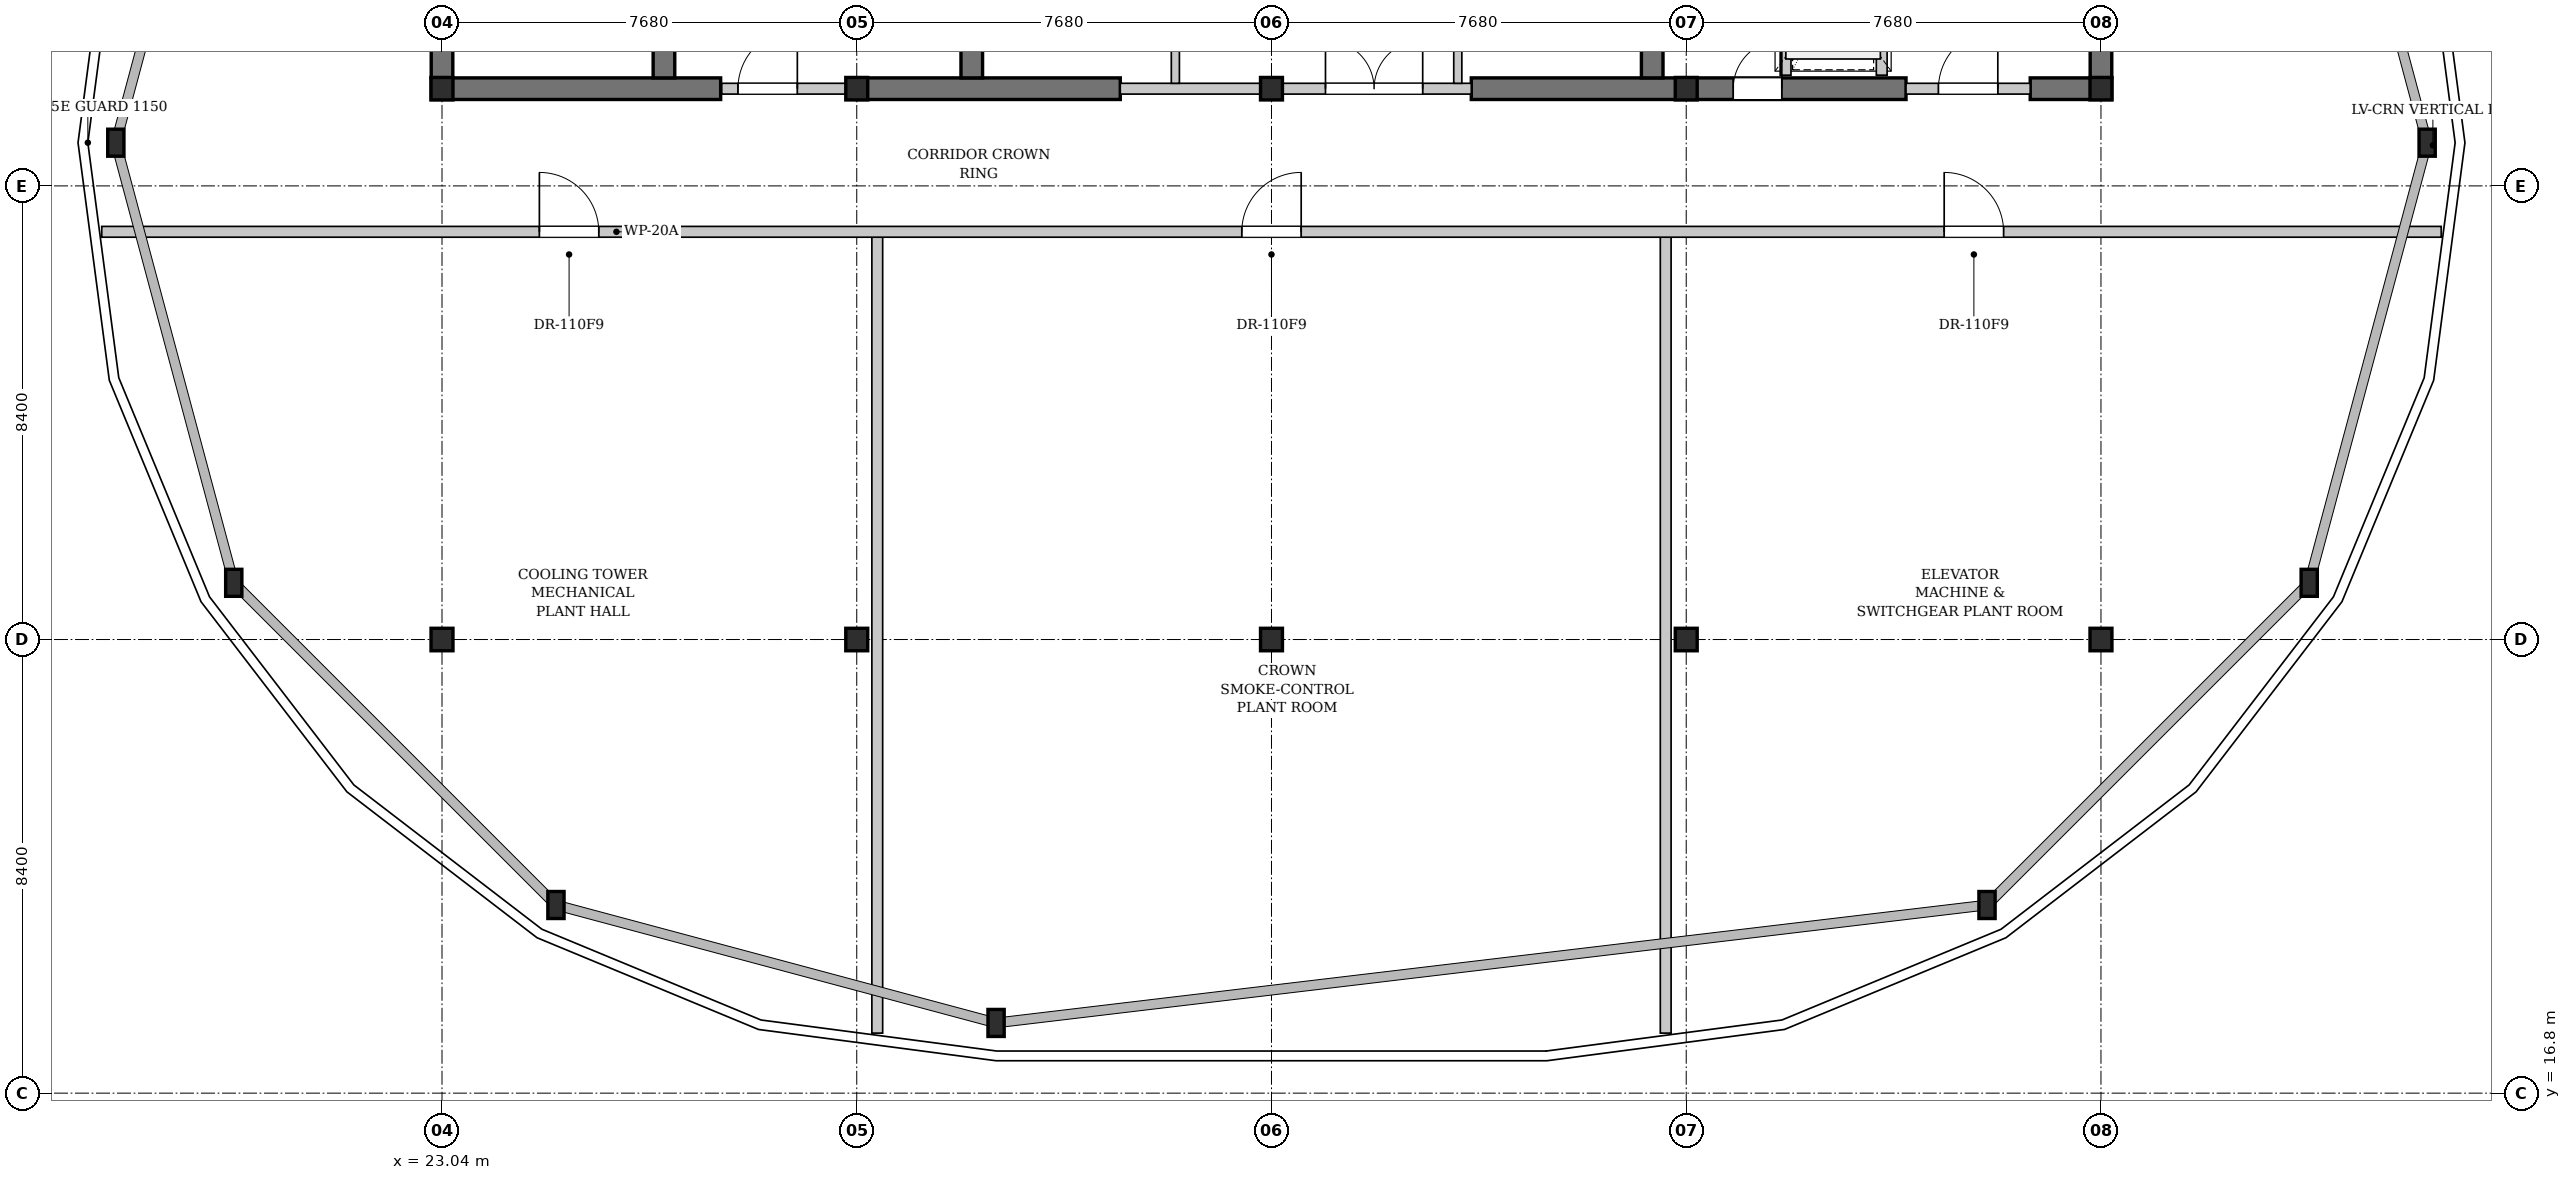
"""IFC4 building model, lengths in metres.
Left out: names, types, materials, properties, quantities, classifications, styles, units other than length and angle.
Written with IfcOpenShell. Run it as: python <this file> out.ifc"""

import sys

from ifc_helpers import new_model, si_unit, direction, frame, frame_2d, origin, origin_2d, place, context, subcontext, project, spatial, rectangle, i_section, extrude, element, fill, save


model = new_model("IFC4")
c1 = context("Model", 3, precision=1e-05, world=origin(), true_north=direction((0.0, 1.0)))
c2 = subcontext(c1, "Body", "Model", "MODEL_VIEW")
j1 = project(units=[si_unit("LENGTHUNIT", "METRE"), si_unit("PLANEANGLEUNIT", "RADIAN")], contexts=[c1])
p1 = place(None, origin())
s1 = spatial("IfcSite", under=j1, at=p1, CompositionType="ELEMENT")
p2 = place(p1, origin())
s2 = spatial("IfcBuilding", under=s1, at=p2, CompositionType="ELEMENT")
p3 = place(p2, frame((0.0, 0.0, 304.4)))
s3 = spatial("IfcBuildingStorey", under=s2, at=p3, CompositionType="ELEMENT", Elevation=304.4)
p4 = place(p3, frame((22.84, 35.4, 0.0), z_axis=(0.0, 0.0, 1.0), x_axis=(1.0, 0.0, 0.0)))
e1 = element("IfcWall", 1, at=p4, inside=s3, PredefinedType="SHEAR", context=c2, shape_type="SweptSolid", body=[
    extrude(rectangle(XDim=5.36, YDim=0.4, at=frame_2d((2.68, 0.0))), origin(), (0.0, 0.0, 1.0), 5.28),
])
p5 = place(p3, frame((30.72, 35.4, 0.0), z_axis=(0.0, 0.0, 1.0), x_axis=(1.0, 0.0, 0.0)))
e2 = element("IfcWall", 2, at=p5, inside=s3, PredefinedType="SHEAR", context=c2, shape_type="SweptSolid", body=[
    extrude(rectangle(XDim=4.88, YDim=0.4, at=frame_2d((2.44, 0.0))), origin(), (0.0, 0.0, 1.0), 5.28),
])
p6 = place(p3, frame((42.1, 35.4, 0.0), z_axis=(0.0, 0.0, 1.0), x_axis=(1.0, 0.0, 0.0)))
e3 = element("IfcWall", 3, at=p6, inside=s3, PredefinedType="SHEAR", context=c2, shape_type="SweptSolid", body=[
    extrude(rectangle(XDim=8.05, YDim=0.4, at=frame_2d((4.025, 0.0))), origin(), (0.0, 0.0, 1.0), 5.28),
])
p7 = place(p6, frame((4.85, 0.0, 0.0)))
e4 = element("IfcOpeningElement", 4, at=p7, cuts=e3, PredefinedType="OPENING", context=c2, shape_type="SweptSolid", body=[
    extrude(rectangle(XDim=0.9, YDim=2.15, at=frame_2d((0.45, 1.075))), frame((0.0, 0.21, 0.0), z_axis=(0.0, -1.0, 0.0), x_axis=(1.0, 0.0, 0.0)), (0.0, 0.0, 1.0), 0.42),
])
p8 = place(p3, frame((52.45, 35.4, 0.0), z_axis=(0.0, 0.0, 1.0), x_axis=(1.0, 0.0, 0.0)))
e5 = element("IfcWall", 5, at=p8, inside=s3, PredefinedType="SHEAR", context=c2, shape_type="SweptSolid", body=[
    extrude(rectangle(XDim=1.51, YDim=0.4, at=frame_2d((0.755, 0.0))), origin(), (0.0, 0.0, 1.0), 5.28),
])
p9 = place(p3, frame((23.04, 35.6, 0.0), z_axis=(0.0, 0.0, 1.0), x_axis=(0.0, 1.0, 0.0)))
e6 = element("IfcWall", 6, at=p9, inside=s3, PredefinedType="SHEAR", context=c2, shape_type="SweptSolid", body=[
    extrude(rectangle(XDim=10.4, YDim=0.4, at=frame_2d((5.2, 0.0))), origin(), (0.0, 0.0, 1.0), 5.28),
])
p10 = place(p3, frame((27.15, 35.6, 0.0), z_axis=(0.0, 0.0, 1.0), x_axis=(0.0, 1.0, 0.0)))
e7 = element("IfcWall", 7, at=p10, inside=s3, PredefinedType="SHEAR", context=c2, shape_type="SweptSolid", body=[
    extrude(rectangle(XDim=10.4, YDim=0.4, at=frame_2d((5.2, 0.0))), origin(), (0.0, 0.0, 1.0), 5.28),
])
p11 = place(p10, frame((0.7, 0.0, 0.0)))
e8 = element("IfcOpeningElement", 8, at=p11, cuts=e7, PredefinedType="OPENING", context=c2, shape_type="SweptSolid", body=[
    extrude(rectangle(XDim=1.1, YDim=2.15, at=frame_2d((0.55, 1.075))), frame((0.0, 0.21, 0.0), z_axis=(0.0, -1.0, 0.0), x_axis=(1.0, 0.0, 0.0)), (0.0, 0.0, 1.0), 0.42),
])
for number, where, z_axis, x_axis in (
    (9, (32.85, 35.6, 0.0), (0.0, 0.0, 1.0), (0.0, 1.0, 0.0)),
    (10, (45.45, 35.6, 0.0), (0.0, 0.0, 1.0), (0.0, 1.0, 0.0)),
    (11, (53.76, 35.6, 0.0), (0.0, 0.0, 1.0), (0.0, 1.0, 0.0)),
):
    element("IfcWall", number, at=place(p3, frame(where, z_axis=z_axis, x_axis=x_axis)), inside=s3, PredefinedType="SHEAR", context=c2, shape_type="SweptSolid", body=[
        extrude(rectangle(XDim=10.4, YDim=0.4, at=frame_2d((5.2, 0.0))), origin(), (0.0, 0.0, 1.0), 5.28),
    ])
for number, where, z_axis, x_axis in (
    (12, (23.04, 35.4, 0.0), (0.0, 0.0, 1.0), (1.0, 0.0, 0.0)),
    (13, (23.04, 25.2, 0.0), (0.0, 0.0, 1.0), (1.0, 0.0, 0.0)),
    (14, (30.72, 35.4, 0.0), (0.0, 0.0, 1.0), (1.0, 0.0, 0.0)),
    (15, (30.72, 25.2, 0.0), (0.0, 0.0, 1.0), (1.0, 0.0, 0.0)),
    (16, (38.4, 35.4, 0.0), (0.0, 0.0, 1.0), (1.0, 0.0, 0.0)),
    (17, (38.4, 25.2, 0.0), (0.0, 0.0, 1.0), (1.0, 0.0, 0.0)),
    (18, (46.08, 35.4, 0.0), (0.0, 0.0, 1.0), (1.0, 0.0, 0.0)),
    (19, (46.08, 25.2, 0.0), (0.0, 0.0, 1.0), (1.0, 0.0, 0.0)),
    (20, (53.76, 35.4, 0.0), (0.0, 0.0, 1.0), (1.0, 0.0, 0.0)),
    (21, (53.76, 25.2, 0.0), (0.0, 0.0, 1.0), (1.0, 0.0, 0.0)),
):
    element("IfcColumn", number, at=place(p3, frame(where, z_axis=z_axis, x_axis=x_axis)), inside=s3, PredefinedType="COLUMN", context=c2, shape_type="SweptSolid", body=[
        extrude(i_section(OverallWidth=0.406, OverallDepth=0.416, WebThickness=0.03, FlangeThickness=0.048, FilletRadius=0.015, at=origin_2d()), origin(), (0.0, 0.0, 1.0), 5.6),
    ])
for number, where, z_axis, x_axis in (
    (22, (59.8, 34.4, 0.0), (0.0, 0.0, 1.0), (1.0, 0.0, 0.0)),
    (23, (17.0, 34.4, 0.0), (0.0, 0.0, 1.0), (1.0, 0.0, 0.0)),
    (24, (19.184, 26.25, 0.0), (0.0, 0.0, 1.0), (1.0, 0.0, 0.0)),
    (25, (25.15, 20.284, 0.0), (0.0, 0.0, 1.0), (1.0, 0.0, 0.0)),
    (26, (33.3, 18.1, 0.0), (0.0, 0.0, 1.0), (1.0, 0.0, 0.0)),
    (27, (51.65, 20.284, 0.0), (0.0, 0.0, 1.0), (1.0, 0.0, 0.0)),
    (28, (57.616, 26.25, 0.0), (0.0, 0.0, 1.0), (1.0, 0.0, 0.0)),
):
    element("IfcColumn", number, at=place(p3, frame(where, z_axis=z_axis, x_axis=x_axis)), inside=s3, PredefinedType="COLUMN", context=c2, shape_type="SweptSolid", body=[
        extrude(i_section(OverallWidth=0.3, OverallDepth=0.5, WebThickness=0.014, FlangeThickness=0.028, FilletRadius=0.027, at=origin_2d()), origin(), (0.0, 0.0, 1.0), 5.6),
    ])
p12 = place(p3, frame((28.22, 35.4, 0.0), z_axis=(0.0, 0.0, 1.0), x_axis=(1.0, 0.0, 0.0)))
e29 = element("IfcWall", 29, at=p12, inside=s3, PredefinedType="PARTITIONING", context=c2, shape_type="SweptSolid", body=[
    extrude(rectangle(XDim=2.5, YDim=0.2, at=frame_2d((1.25, 0.0))), origin(), (0.0, 0.0, 1.0), 4.725),
])
p13 = place(p12, frame((0.3, 0.0, 0.0)))
e30 = element("IfcOpeningElement", 30, at=p13, cuts=e29, PredefinedType="OPENING", context=c2, shape_type="SweptSolid", body=[
    extrude(rectangle(XDim=1.1, YDim=2.15, at=frame_2d((0.55, 1.075))), frame((0.0, 0.11, 0.0), z_axis=(0.0, -1.0, 0.0), x_axis=(1.0, 0.0, 0.0)), (0.0, 0.0, 1.0), 0.22),
])
p14 = place(p3, frame((35.6, 35.4, 0.0), z_axis=(0.0, 0.0, 1.0), x_axis=(1.0, 0.0, 0.0)))
e31 = element("IfcWall", 31, at=p14, inside=s3, PredefinedType="PARTITIONING", context=c2, shape_type="SweptSolid", body=[
    extrude(rectangle(XDim=6.5, YDim=0.2, at=frame_2d((3.25, 0.0))), origin(), (0.0, 0.0, 1.0), 4.725),
])
p15 = place(p14, frame((3.8, 0.0, 0.0)))
e32 = element("IfcOpeningElement", 32, at=p15, cuts=e31, PredefinedType="OPENING", context=c2, shape_type="SweptSolid", body=[
    extrude(rectangle(XDim=1.8, YDim=2.3, at=frame_2d((0.9, 1.15))), frame((0.0, 0.11, 0.0), z_axis=(0.0, -1.0, 0.0), x_axis=(1.0, 0.0, 0.0)), (0.0, 0.0, 1.0), 0.22),
])
p16 = place(p3, frame((36.62, 35.5, 0.0), z_axis=(0.0, 0.0, 1.0), x_axis=(0.0, 1.0, 0.0)))
e33 = element("IfcWall", 33, at=p16, inside=s3, PredefinedType="PARTITIONING", context=c2, shape_type="SweptSolid", body=[
    extrude(rectangle(XDim=10.42, YDim=0.15, at=frame_2d((5.21, 0.0))), origin(), (0.0, 0.0, 1.0), 5.28),
])
p17 = place(p16, frame((3.92, 0.0, 0.0)))
e34 = element("IfcOpeningElement", 34, at=p17, cuts=e33, PredefinedType="OPENING", context=c2, shape_type="SweptSolid", body=[
    extrude(rectangle(XDim=0.9, YDim=2.15, at=frame_2d((0.45, 1.075))), frame((0.0, 0.085, 0.0), z_axis=(0.0, -1.0, 0.0), x_axis=(1.0, 0.0, 0.0)), (0.0, 0.0, 1.0), 0.17),
])
p18 = place(p16, frame((5.85, 0.0, 0.0)))
e35 = element("IfcOpeningElement", 35, at=p18, cuts=e33, PredefinedType="OPENING", context=c2, shape_type="SweptSolid", body=[
    extrude(rectangle(XDim=0.9, YDim=2.15, at=frame_2d((0.45, 1.075))), frame((0.0, 0.085, 0.0), z_axis=(0.0, -1.0, 0.0), x_axis=(1.0, 0.0, 0.0)), (0.0, 0.0, 1.0), 0.17),
])
p19 = place(p3, frame((41.85, 35.5, 0.0), z_axis=(0.0, 0.0, 1.0), x_axis=(0.0, 1.0, 0.0)))
e36 = element("IfcWall", 36, at=p19, inside=s3, PredefinedType="PARTITIONING", context=c2, shape_type="SweptSolid", body=[
    extrude(rectangle(XDim=10.42, YDim=0.15, at=frame_2d((5.21, 0.0))), origin(), (0.0, 0.0, 1.0), 5.28),
])
p20 = place(p19, frame((3.92, 0.0, 0.0)))
e37 = element("IfcOpeningElement", 37, at=p20, cuts=e36, PredefinedType="OPENING", context=c2, shape_type="SweptSolid", body=[
    extrude(rectangle(XDim=0.9, YDim=2.15, at=frame_2d((0.45, 1.075))), frame((0.0, 0.085, 0.0), z_axis=(0.0, -1.0, 0.0), x_axis=(1.0, 0.0, 0.0)), (0.0, 0.0, 1.0), 0.17),
])
p21 = place(p19, frame((5.85, 0.0, 0.0)))
e38 = element("IfcOpeningElement", 38, at=p21, cuts=e36, PredefinedType="OPENING", context=c2, shape_type="SweptSolid", body=[
    extrude(rectangle(XDim=0.9, YDim=2.15, at=frame_2d((0.45, 1.075))), frame((0.0, 0.085, 0.0), z_axis=(0.0, -1.0, 0.0), x_axis=(1.0, 0.0, 0.0)), (0.0, 0.0, 1.0), 0.17),
])
p22 = place(p3, frame((50.15, 35.4, 0.0), z_axis=(0.0, 0.0, 1.0), x_axis=(1.0, 0.0, 0.0)))
e39 = element("IfcWall", 39, at=p22, inside=s3, PredefinedType="PARTITIONING", context=c2, shape_type="SweptSolid", body=[
    extrude(rectangle(XDim=2.3, YDim=0.2, at=frame_2d((1.15, 0.0))), origin(), (0.0, 0.0, 1.0), 4.725),
])
p23 = place(p22, frame((0.6, 0.0, 0.0)))
e40 = element("IfcOpeningElement", 40, at=p23, cuts=e39, PredefinedType="OPENING", context=c2, shape_type="SweptSolid", body=[
    extrude(rectangle(XDim=1.1, YDim=2.15, at=frame_2d((0.55, 1.075))), frame((0.0, 0.11, 0.0), z_axis=(0.0, -1.0, 0.0), x_axis=(1.0, 0.0, 0.0)), (0.0, 0.0, 1.0), 0.22),
])
p24 = place(p3, frame((49.7, 35.65, 0.0), z_axis=(0.0, 0.0, 1.0), x_axis=(0.0, 1.0, 0.0)))
e41 = element("IfcWall", 41, at=p24, inside=s3, PredefinedType="PARTITIONING", context=c2, shape_type="SweptSolid", body=[
    extrude(rectangle(XDim=3.15, YDim=0.2, at=frame_2d((1.575, 0.0))), origin(), (0.0, 0.0, 1.0), 5.28),
])
p25 = place(p24, frame((0.85, 0.0, 0.0)))
e42 = element("IfcOpeningElement", 42, at=p25, cuts=e41, PredefinedType="OPENING", context=c2, shape_type="SweptSolid", body=[
    extrude(rectangle(XDim=1.2, YDim=2.2, at=frame_2d((0.6, 1.1))), frame((0.0, 0.11, 0.0), z_axis=(0.0, -1.0, 0.0), x_axis=(1.0, 0.0, 0.0)), (0.0, 0.0, 1.0), 0.22),
])
p26 = place(p3, frame((47.92, 35.65, 0.0), z_axis=(0.0, 0.0, 1.0), x_axis=(0.0, 1.0, 0.0)))
e43 = element("IfcWall", 43, at=p26, inside=s3, PredefinedType="PARTITIONING", context=c2, shape_type="SweptSolid", body=[
    extrude(rectangle(XDim=3.15, YDim=0.2, at=frame_2d((1.575, 0.0))), origin(), (0.0, 0.0, 1.0), 5.28),
])
p27 = place(p3, frame((31.1, 17.912, 0.0), z_axis=(0.0, 0.0, 1.0), x_axis=(0.0, 1.0, 0.0)))
e44 = element("IfcWall", 44, at=p27, inside=s3, PredefinedType="PARTITIONING", context=c2, shape_type="SweptSolid", body=[
    extrude(rectangle(XDim=14.838, YDim=0.2, at=frame_2d((7.419, 0.0))), origin(), (0.0, 0.0, 1.0), 4.725),
])
p28 = place(p3, frame((45.7, 17.912, 0.0), z_axis=(0.0, 0.0, 1.0), x_axis=(0.0, 1.0, 0.0)))
e45 = element("IfcWall", 45, at=p28, inside=s3, PredefinedType="PARTITIONING", context=c2, shape_type="SweptSolid", body=[
    extrude(rectangle(XDim=14.838, YDim=0.2, at=frame_2d((7.419, 0.0))), origin(), (0.0, 0.0, 1.0), 5.28),
])
p29 = place(p3, frame((16.739, 32.75, 0.0), z_axis=(0.0, 0.0, 1.0), x_axis=(1.0, 0.0, 0.0)))
e46 = element("IfcWall", 46, at=p29, inside=s3, PredefinedType="PARTITIONING", context=c2, shape_type="SweptSolid", body=[
    extrude(rectangle(XDim=43.322, YDim=0.2, at=frame_2d((21.661, 0.0))), origin(), (0.0, 0.0, 1.0), 5.28),
])
p30 = place(p29, frame((8.104, 0.0, 0.0)))
e47 = element("IfcOpeningElement", 47, at=p30, cuts=e46, PredefinedType="OPENING", context=c2, shape_type="SweptSolid", body=[
    extrude(rectangle(XDim=1.1, YDim=2.15, at=frame_2d((0.55, 1.075))), frame((0.0, 0.11, 0.0), z_axis=(0.0, -1.0, 0.0), x_axis=(1.0, 0.0, 0.0)), (0.0, 0.0, 1.0), 0.22),
])
p31 = place(p29, frame((21.111, 0.0, 0.0)))
e48 = element("IfcOpeningElement", 48, at=p31, cuts=e46, PredefinedType="OPENING", context=c2, shape_type="SweptSolid", body=[
    extrude(rectangle(XDim=1.1, YDim=2.15, at=frame_2d((0.55, 1.075))), frame((0.0, 0.11, 0.0), z_axis=(0.0, -1.0, 0.0), x_axis=(1.0, 0.0, 0.0)), (0.0, 0.0, 1.0), 0.22),
])
p32 = place(p29, frame((34.118, 0.0, 0.0)))
e49 = element("IfcOpeningElement", 49, at=p32, cuts=e46, PredefinedType="OPENING", context=c2, shape_type="SweptSolid", body=[
    extrude(rectangle(XDim=1.1, YDim=2.15, at=frame_2d((0.55, 1.075))), frame((0.0, 0.11, 0.0), z_axis=(0.0, -1.0, 0.0), x_axis=(1.0, 0.0, 0.0)), (0.0, 0.0, 1.0), 0.22),
])
p33 = place(p13, origin())
e50 = element("IfcDoor", 50, at=p33, inside=s3, OperationType="SINGLE_SWING_RIGHT", PredefinedType="DOOR", context=c2, shape_type="SweptSolid", body=[
    extrude(rectangle(XDim=1.1, YDim=2.15, at=frame_2d((0.55, 1.075))), frame((0.0, 0.025, 0.0), z_axis=(0.0, -1.0, 0.0), x_axis=(1.0, 0.0, 0.0)), (0.0, 0.0, 1.0), 0.05),
])
fill(e30, e50)
p34 = place(p15, origin())
e51 = element("IfcDoor", 51, at=p34, inside=s3, OperationType="DOUBLE_DOOR_SINGLE_SWING", PredefinedType="DOOR", context=c2, shape_type="SweptSolid", body=[
    extrude(rectangle(XDim=1.8, YDim=2.3, at=frame_2d((0.9, 1.15))), frame((0.0, 0.025, 0.0), z_axis=(0.0, -1.0, 0.0), x_axis=(1.0, 0.0, 0.0)), (0.0, 0.0, 1.0), 0.05),
])
fill(e32, e51)
p35 = place(p23, origin())
e52 = element("IfcDoor", 52, at=p35, inside=s3, OperationType="SINGLE_SWING_RIGHT", PredefinedType="DOOR", context=c2, shape_type="SweptSolid", body=[
    extrude(rectangle(XDim=1.1, YDim=2.15, at=frame_2d((0.55, 1.075))), frame((0.0, 0.025, 0.0), z_axis=(0.0, -1.0, 0.0), x_axis=(1.0, 0.0, 0.0)), (0.0, 0.0, 1.0), 0.05),
])
fill(e40, e52)
p36 = place(p30, origin())
e53 = element("IfcDoor", 53, at=p36, inside=s3, OperationType="SINGLE_SWING_LEFT", PredefinedType="DOOR", context=c2, shape_type="SweptSolid", body=[
    extrude(rectangle(XDim=1.1, YDim=2.15, at=frame_2d((0.55, 1.075))), frame((0.0, 0.025, 0.0), z_axis=(0.0, -1.0, 0.0), x_axis=(1.0, 0.0, 0.0)), (0.0, 0.0, 1.0), 0.05),
])
fill(e47, e53)
p37 = place(p31, origin())
e54 = element("IfcDoor", 54, at=p37, inside=s3, OperationType="SINGLE_SWING_RIGHT", PredefinedType="DOOR", context=c2, shape_type="SweptSolid", body=[
    extrude(rectangle(XDim=1.1, YDim=2.15, at=frame_2d((0.55, 1.075))), frame((0.0, 0.025, 0.0), z_axis=(0.0, -1.0, 0.0), x_axis=(1.0, 0.0, 0.0)), (0.0, 0.0, 1.0), 0.05),
])
fill(e48, e54)
p38 = place(p32, origin())
e55 = element("IfcDoor", 55, at=p38, inside=s3, OperationType="SINGLE_SWING_LEFT", PredefinedType="DOOR", context=c2, shape_type="SweptSolid", body=[
    extrude(rectangle(XDim=1.1, YDim=2.15, at=frame_2d((0.55, 1.075))), frame((0.0, 0.025, 0.0), z_axis=(0.0, -1.0, 0.0), x_axis=(1.0, 0.0, 0.0)), (0.0, 0.0, 1.0), 0.05),
])
fill(e49, e55)
p39 = place(p7, origin())
e56 = element("IfcDoor", 56, at=p39, inside=s3, OperationType="SINGLE_SWING_RIGHT", PredefinedType="DOOR", context=c2, shape_type="SweptSolid", body=[
    extrude(rectangle(XDim=0.9, YDim=2.15, at=frame_2d((0.45, 1.075))), frame((0.0, 0.025, 0.0), z_axis=(0.0, -1.0, 0.0), x_axis=(1.0, 0.0, 0.0)), (0.0, 0.0, 1.0), 0.05),
])
fill(e4, e56)
save(model, sys.argv[1])
